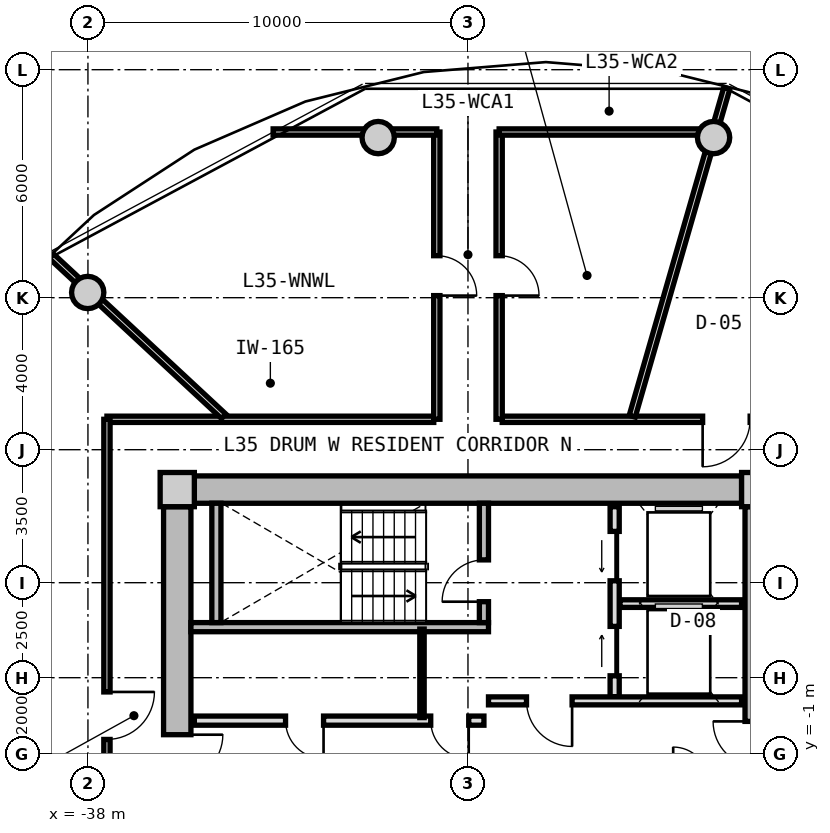
"""IFC4 building model, lengths in metres.
Left out: names, types, materials, properties, quantities, classifications, styles, units other than length and angle.
Written with IfcOpenShell. Run it as: python <this file> out.ifc"""

import sys

from ifc_helpers import new_model, si_unit, direction, frame, frame_2d, origin, origin_2d, place, context, subcontext, project, spatial, rectangle, circle, extrude, source, transform, mapped, element, fill, save


model = new_model("IFC4")
c1 = context("Model", 3, precision=1e-05, world=origin(), true_north=direction((0.0, 1.0)))
c2 = subcontext(c1, "Body", "Model", "MODEL_VIEW")
j1 = project(units=[si_unit("LENGTHUNIT", "METRE"), si_unit("PLANEANGLEUNIT", "RADIAN")], contexts=[c1])
p1 = place(None, origin())
s1 = spatial("IfcSite", under=j1, at=p1, CompositionType="ELEMENT")
p2 = place(p1, origin())
s2 = spatial("IfcBuilding", under=s1, at=p2, CompositionType="ELEMENT")
p3 = place(p2, frame((0.0, 0.0, 114.55)))
s3 = spatial("IfcBuildingStorey", under=s2, at=p3, CompositionType="ELEMENT", Elevation=114.55)
m1 = source(origin(), c2, "Body", "SweptSolid", [
    extrude(rectangle(XDim=0.9, YDim=0.9, at=origin_2d()), origin(), (0.0, 0.0, 1.0), 3.05),
])
for number, where, z_axis, x_axis in (
    (1, (-20.35, 5.95, 0.0), (0.0, 0.0, 1.0), (1.0, 0.0, 0.0)),
    (2, (-35.65, 5.95, 0.0), (0.0, 0.0, 1.0), (1.0, 0.0, 0.0)),
):
    element("IfcColumn", number, at=place(p3, frame(where, z_axis=z_axis, x_axis=x_axis)), inside=s3, PredefinedType="COLUMN", context=c2, shape_type="MappedRepresentation", body=[
        mapped(m1, transform((0.0, 0.0, 0.0), x_axis=(1.0, 0.0, 0.0), y_axis=(0.0, 1.0, 0.0), z_axis=(0.0, 0.0, 1.0), scale=1.0)),
    ])
m2 = source(origin(), c2, "Body", "SweptSolid", [
    extrude(rectangle(XDim=14.4, YDim=0.72, at=frame_2d((7.2, 0.0))), origin(), (0.0, 0.0, 1.0), 2.79),
])
p4 = place(p3, frame((-35.2, 5.95, 0.0), z_axis=(0.0, 0.0, 1.0), x_axis=(1.0, 0.0, 0.0)))
e3 = element("IfcWall", 3, at=p4, inside=s3, PredefinedType="SHEAR", context=c2, shape_type="MappedRepresentation", body=[
    mapped(m2, transform((0.0, 0.0, 0.0), x_axis=(1.0, 0.0, 0.0), y_axis=(0.0, 1.0, 0.0), z_axis=(0.0, 0.0, 1.0), scale=1.0)),
])
m3 = source(origin(), c2, "Body", "SweptSolid", [
    extrude(rectangle(XDim=11.0, YDim=0.72, at=frame_2d((5.5, 0.0))), origin(), (0.0, 0.0, 1.0), 2.79),
])
p5 = place(p3, frame((-35.65, -5.5, 0.0), z_axis=(0.0, 0.0, 1.0), x_axis=(0.0, 1.0, 0.0)))
e4 = element("IfcWall", 4, at=p5, inside=s3, PredefinedType="SHEAR", context=c2, shape_type="MappedRepresentation", body=[
    mapped(m3, transform((0.0, 0.0, 0.0), x_axis=(1.0, 0.0, 0.0), y_axis=(0.0, 1.0, 0.0), z_axis=(0.0, 0.0, 1.0), scale=1.0)),
])
p6 = place(p5, frame((3.8, 0.0, 0.0)))
e5 = element("IfcOpeningElement", 5, at=p6, cuts=e4, PredefinedType="OPENING", context=c2, shape_type="SweptSolid", body=[
    extrude(rectangle(XDim=1.2, YDim=2.15, at=frame_2d((0.6, 1.075))), frame((0.0, 0.37, 0.0), z_axis=(0.0, -1.0, 0.0), x_axis=(1.0, 0.0, 0.0)), (0.0, 0.0, 1.0), 0.74),
])
p7 = place(p3, frame((-20.35, 5.5, 0.0), z_axis=(0.0, 0.0, 1.0), x_axis=(0.0, -1.0, 0.0)))
e6 = element("IfcWall", 6, at=p7, inside=s3, PredefinedType="SHEAR", context=c2, shape_type="MappedRepresentation", body=[
    mapped(m3, transform((0.0, 0.0, 0.0), x_axis=(1.0, 0.0, 0.0), y_axis=(0.0, 1.0, 0.0), z_axis=(0.0, 0.0, 1.0), scale=1.0)),
])
p8 = place(p7, frame((5.65, 0.0, 0.0)))
e7 = element("IfcOpeningElement", 7, at=p8, cuts=e6, PredefinedType="OPENING", context=c2, shape_type="SweptSolid", body=[
    extrude(rectangle(XDim=1.2, YDim=2.15, at=frame_2d((0.6, 1.075))), frame((0.0, 0.37, 0.0), z_axis=(0.0, -1.0, 0.0), x_axis=(1.0, 0.0, 0.0)), (0.0, 0.0, 1.0), 0.74),
])
p9 = place(p7, frame((9.3, 0.0, 0.0)))
e8 = element("IfcOpeningElement", 8, at=p9, cuts=e6, PredefinedType="OPENING", context=c2, shape_type="SweptSolid", body=[
    extrude(rectangle(XDim=1.0, YDim=2.1, at=frame_2d((0.5, 1.05))), frame((0.0, 0.37, 0.0), z_axis=(0.0, -1.0, 0.0), x_axis=(1.0, 0.0, 0.0)), (0.0, 0.0, 1.0), 0.74),
])
m4 = source(origin(), c2, "Body", "SweptSolid", [
    extrude(circle(Radius=0.425, at=origin_2d()), origin(), (0.0, 0.0, 1.0), 3.05),
])
for number, where, z_axis, x_axis in (
    (9, (-21.537, 15.213, 0.0), (0.0, 0.0, 1.0), (1.0, 0.0, 0.0)),
    (10, (-30.363, 15.213, 0.0), (0.0, 0.0, 1.0), (1.0, 0.0, 0.0)),
    (11, (-38.006, 11.137, 0.0), (0.0, 0.0, 1.0), (1.0, 0.0, 0.0)),
):
    element("IfcColumn", number, at=place(p3, frame(where, z_axis=z_axis, x_axis=x_axis)), inside=s3, PredefinedType="COLUMN", context=c2, shape_type="MappedRepresentation", body=[
        mapped(m4, transform((0.0, 0.0, 0.0), x_axis=(1.0, 0.0, 0.0), y_axis=(0.0, 1.0, 0.0), z_axis=(0.0, 0.0, 1.0), scale=1.0)),
    ])
m5 = source(origin(), c2, "Body", "SweptSolid", [
    extrude(rectangle(XDim=7.83, YDim=0.24, at=frame_2d((3.915, 0.0))), origin(), (0.0, 0.0, 1.0), 2.79),
])
p10 = place(p3, frame((-35.29, 2.33, 0.0), z_axis=(0.0, 0.0, 1.0), x_axis=(1.0, 0.0, 0.0)))
e12 = element("IfcWall", 12, at=p10, inside=s3, PredefinedType="PARTITIONING", context=c2, shape_type="MappedRepresentation", body=[
    mapped(m5, transform((0.0, 0.0, 0.0), x_axis=(1.0, 0.0, 0.0), y_axis=(0.0, 1.0, 0.0), z_axis=(0.0, 0.0, 1.0), scale=1.0)),
])
m6 = source(origin(), c2, "Body", "SweptSolid", [
    extrude(rectangle(XDim=3.14, YDim=0.24, at=frame_2d((1.57, 0.0))), origin(), (0.0, 0.0, 1.0), 2.79),
])
p11 = place(p3, frame((-34.62, 2.45, 0.0), z_axis=(0.0, 0.0, 1.0), x_axis=(0.0, 1.0, 0.0)))
e13 = element("IfcWall", 13, at=p11, inside=s3, PredefinedType="PARTITIONING", context=c2, shape_type="MappedRepresentation", body=[
    mapped(m6, transform((0.0, 0.0, 0.0), x_axis=(1.0, 0.0, 0.0), y_axis=(0.0, 1.0, 0.0), z_axis=(0.0, 0.0, 1.0), scale=1.0)),
])
p12 = place(p3, frame((-27.58, 2.45, 0.0), z_axis=(0.0, 0.0, 1.0), x_axis=(0.0, 1.0, 0.0)))
e14 = element("IfcWall", 14, at=p12, inside=s3, PredefinedType="PARTITIONING", context=c2, shape_type="MappedRepresentation", body=[
    mapped(m6, transform((0.0, 0.0, 0.0), x_axis=(1.0, 0.0, 0.0), y_axis=(0.0, 1.0, 0.0), z_axis=(0.0, 0.0, 1.0), scale=1.0)),
])
p13 = place(p12, frame((0.55, 0.0, 0.0)))
e15 = element("IfcOpeningElement", 15, at=p13, cuts=e14, PredefinedType="OPENING", context=c2, shape_type="SweptSolid", body=[
    extrude(rectangle(XDim=1.1, YDim=2.15, at=frame_2d((0.55, 1.075))), frame((0.0, 0.13, 0.0), z_axis=(0.0, -1.0, 0.0), x_axis=(1.0, 0.0, 0.0)), (0.0, 0.0, 1.0), 0.26),
])
m7 = source(origin(), c2, "Body", "SweptSolid", [
    extrude(rectangle(XDim=5.0, YDim=0.24, at=frame_2d((2.5, 0.0))), origin(), (0.0, 0.0, 1.0), 2.775),
])
p14 = place(p3, frame((-24.14, 0.5, 0.0), z_axis=(0.0, 0.0, 1.0), x_axis=(0.0, 1.0, 0.0)))
e16 = element("IfcWall", 16, at=p14, inside=s3, PredefinedType="PARTITIONING", context=c2, shape_type="MappedRepresentation", body=[
    mapped(m7, transform((0.0, 0.0, 0.0), x_axis=(1.0, 0.0, 0.0), y_axis=(0.0, 1.0, 0.0), z_axis=(0.0, 0.0, 1.0), scale=1.0)),
])
p15 = place(p14, frame((3.05, 0.0, 0.0)))
e17 = element("IfcOpeningElement", 17, at=p15, cuts=e16, PredefinedType="OPENING", context=c2, shape_type="SweptSolid", body=[
    extrude(rectangle(XDim=1.3, YDim=2.2, at=frame_2d((0.65, 1.1))), frame((0.0, 0.13, 0.0), z_axis=(0.0, -1.0, 0.0), x_axis=(1.0, 0.0, 0.0)), (0.0, 0.0, 1.0), 0.26),
])
p16 = place(p14, frame((0.55, 0.0, 0.0)))
e18 = element("IfcOpeningElement", 18, at=p16, cuts=e16, PredefinedType="OPENING", context=c2, shape_type="SweptSolid", body=[
    extrude(rectangle(XDim=1.3, YDim=2.2, at=frame_2d((0.65, 1.1))), frame((0.0, 0.13, 0.0), z_axis=(0.0, -1.0, 0.0), x_axis=(1.0, 0.0, 0.0)), (0.0, 0.0, 1.0), 0.26),
])
m8 = source(origin(), c2, "Body", "SweptSolid", [
    extrude(rectangle(XDim=3.2, YDim=0.2, at=frame_2d((1.6, 0.0))), origin(), (0.0, 0.0, 1.0), 2.775),
])
p17 = place(p3, frame((-24.0, 2.95, 0.0), z_axis=(0.0, 0.0, 1.0), x_axis=(1.0, 0.0, 0.0)))
e19 = element("IfcWall", 19, at=p17, inside=s3, PredefinedType="PARTITIONING", context=c2, shape_type="MappedRepresentation", body=[
    mapped(m8, transform((0.0, 0.0, 0.0), x_axis=(1.0, 0.0, 0.0), y_axis=(0.0, 1.0, 0.0), z_axis=(0.0, 0.0, 1.0), scale=1.0)),
])
m9 = source(origin(), c2, "Body", "SweptSolid", [
    extrude(rectangle(XDim=6.66, YDim=0.21, at=frame_2d((3.33, 0.0))), origin(), (0.0, 0.0, 1.0), 2.775),
])
p18 = place(p3, frame((-27.46, 0.39, 0.0), z_axis=(0.0, 0.0, 1.0), x_axis=(1.0, 0.0, 0.0)))
e20 = element("IfcWall", 20, at=p18, inside=s3, PredefinedType="PARTITIONING", context=c2, shape_type="MappedRepresentation", body=[
    mapped(m9, transform((0.0, 0.0, 0.0), x_axis=(1.0, 0.0, 0.0), y_axis=(0.0, 1.0, 0.0), z_axis=(0.0, 0.0, 1.0), scale=1.0)),
])
p19 = place(p18, frame((1.0, 0.0, 0.0)))
e21 = element("IfcOpeningElement", 21, at=p19, cuts=e20, PredefinedType="OPENING", context=c2, shape_type="SweptSolid", body=[
    extrude(rectangle(XDim=1.2, YDim=2.15, at=frame_2d((0.6, 1.075))), frame((0.0, 0.115, 0.0), z_axis=(0.0, -1.0, 0.0), x_axis=(1.0, 0.0, 0.0)), (0.0, 0.0, 1.0), 0.23),
])
m10 = source(origin(), c2, "Body", "SweptSolid", [
    extrude(rectangle(XDim=7.62, YDim=0.24, at=frame_2d((3.81, 0.0))), origin(), (0.0, 0.0, 1.0), 2.775),
])
p20 = place(p3, frame((-35.2, -0.13, 0.0), z_axis=(0.0, 0.0, 1.0), x_axis=(1.0, 0.0, 0.0)))
e22 = element("IfcWall", 22, at=p20, inside=s3, PredefinedType="PARTITIONING", context=c2, shape_type="MappedRepresentation", body=[
    mapped(m10, transform((0.0, 0.0, 0.0), x_axis=(1.0, 0.0, 0.0), y_axis=(0.0, 1.0, 0.0), z_axis=(0.0, 0.0, 1.0), scale=1.0)),
])
p21 = place(p20, frame((6.22, 0.0, 0.0)))
e23 = element("IfcOpeningElement", 23, at=p21, cuts=e22, PredefinedType="OPENING", context=c2, shape_type="SweptSolid", body=[
    extrude(rectangle(XDim=1.0, YDim=2.1, at=frame_2d((0.5, 1.05))), frame((0.0, 0.13, 0.0), z_axis=(0.0, -1.0, 0.0), x_axis=(1.0, 0.0, 0.0)), (0.0, 0.0, 1.0), 0.26),
])
p22 = place(p20, frame((2.4, 0.0, 0.0)))
e24 = element("IfcOpeningElement", 24, at=p22, cuts=e22, PredefinedType="OPENING", context=c2, shape_type="SweptSolid", body=[
    extrude(rectangle(XDim=1.0, YDim=2.1, at=frame_2d((0.5, 1.05))), frame((0.0, 0.13, 0.0), z_axis=(0.0, -1.0, 0.0), x_axis=(1.0, 0.0, 0.0)), (0.0, 0.0, 1.0), 0.26),
])
m11 = source(origin(), c2, "Body", "SweptSolid", [
    extrude(rectangle(XDim=2.33, YDim=0.115, at=frame_2d((1.165, 0.0))), origin(), (0.0, 0.0, 1.0), 2.775),
])
p23 = place(p3, frame((-29.21, -0.05, 0.0), z_axis=(0.0, 0.0, 1.0), x_axis=(0.0, 1.0, 0.0)))
e25 = element("IfcWall", 25, at=p23, inside=s3, PredefinedType="PARTITIONING", context=c2, shape_type="MappedRepresentation", body=[
    mapped(m11, transform((0.0, 0.0, 0.0), x_axis=(1.0, 0.0, 0.0), y_axis=(0.0, 1.0, 0.0), z_axis=(0.0, 0.0, 1.0), scale=1.0)),
])
m12 = source(origin(), c2, "Body", "SweptSolid", [
    extrude(rectangle(XDim=8.6, YDim=0.165, at=frame_2d((4.3, 0.0))), origin(), (0.0, 0.0, 1.0), 2.775),
])
p24 = place(p3, frame((-37.5, 7.8, 0.0), z_axis=(0.0, 0.0, 1.0), x_axis=(1.0, 0.0, 0.0)))
e26 = element("IfcWall", 26, at=p24, inside=s3, PredefinedType="PARTITIONING", context=c2, shape_type="MappedRepresentation", body=[
    mapped(m12, transform((0.0, 0.0, 0.0), x_axis=(1.0, 0.0, 0.0), y_axis=(0.0, 1.0, 0.0), z_axis=(0.0, 0.0, 1.0), scale=1.0)),
])
p25 = place(p3, frame((-27.1, 7.8, 0.0), z_axis=(0.0, 0.0, 1.0), x_axis=(1.0, 0.0, 0.0)))
e27 = element("IfcWall", 27, at=p25, inside=s3, PredefinedType="PARTITIONING", context=c2, shape_type="MappedRepresentation", body=[
    mapped(m12, transform((0.0, 0.0, 0.0), x_axis=(1.0, 0.0, 0.0), y_axis=(0.0, 1.0, 0.0), z_axis=(0.0, 0.0, 1.0), scale=1.0)),
])
p26 = place(p25, frame((5.275, 0.0, 0.0)))
e28 = element("IfcOpeningElement", 28, at=p26, cuts=e27, PredefinedType="OPENING", context=c2, shape_type="SweptSolid", body=[
    extrude(rectangle(XDim=1.25, YDim=2.2, at=frame_2d((0.625, 1.1))), frame((0.0, 0.093, 0.0), z_axis=(0.0, -1.0, 0.0), x_axis=(1.0, 0.0, 0.0)), (0.0, 0.0, 1.0), 0.185),
])
m13 = source(origin(), c2, "Body", "SweptSolid", [
    extrude(rectangle(XDim=15.6, YDim=0.165, at=frame_2d((7.8, 0.0))), origin(), (0.0, 0.0, 1.0), 2.775),
])
p27 = place(p3, frame((-37.5, -7.8, 0.0), z_axis=(0.0, 0.0, 1.0), x_axis=(0.0, 1.0, 0.0)))
e29 = element("IfcWall", 29, at=p27, inside=s3, PredefinedType="PARTITIONING", context=c2, shape_type="MappedRepresentation", body=[
    mapped(m13, transform((0.0, 0.0, 0.0), x_axis=(1.0, 0.0, 0.0), y_axis=(0.0, 1.0, 0.0), z_axis=(0.0, 0.0, 1.0), scale=1.0)),
])
p28 = place(p27, frame((7.175, 0.0, 0.0)))
e30 = element("IfcOpeningElement", 30, at=p28, cuts=e29, PredefinedType="OPENING", context=c2, shape_type="SweptSolid", body=[
    extrude(rectangle(XDim=1.25, YDim=2.2, at=frame_2d((0.625, 1.1))), frame((0.0, 0.093, 0.0), z_axis=(0.0, -1.0, 0.0), x_axis=(1.0, 0.0, 0.0)), (0.0, 0.0, 1.0), 0.185),
])
m14 = source(origin(), c2, "Body", "SweptSolid", [
    extrude(rectangle(XDim=8.989, YDim=0.165, at=frame_2d((4.495, 0.0))), origin(), (0.0, 0.0, 1.0), 2.275),
])
p29 = place(p3, frame((-23.678, 7.88, 0.0), z_axis=(0.0, 0.0, 1.0), x_axis=(0.27702323008, 0.960863221274, 0.0)))
e31 = element("IfcWall", 31, at=p29, inside=s3, PredefinedType="PARTITIONING", context=c2, shape_type="MappedRepresentation", body=[
    mapped(m14, transform((0.0, 0.0, 0.0), x_axis=(1.0, 0.0, 0.0), y_axis=(0.0, 1.0, 0.0), z_axis=(0.0, 0.0, 1.0), scale=1.0)),
])
m15 = source(origin(), c2, "Body", "SweptSolid", [
    extrude(rectangle(XDim=6.187, YDim=0.165, at=frame_2d((3.093, 0.0))), origin(), (0.0, 0.0, 1.0), 2.275),
])
p30 = place(p3, frame((-34.429, 7.88, 0.0), z_axis=(0.0, 0.0, 1.0), x_axis=(-0.732501077882, 0.680765870841, 0.0)))
e32 = element("IfcWall", 32, at=p30, inside=s3, PredefinedType="PARTITIONING", context=c2, shape_type="MappedRepresentation", body=[
    mapped(m15, transform((0.0, 0.0, 0.0), x_axis=(1.0, 0.0, 0.0), y_axis=(0.0, 1.0, 0.0), z_axis=(0.0, 0.0, 1.0), scale=1.0)),
])
m16 = source(origin(), c2, "Body", "SweptSolid", [
    extrude(rectangle(XDim=7.56, YDim=0.165, at=frame_2d((3.78, 0.0))), origin(), (0.0, 0.0, 1.0), 2.775),
])
p31 = place(p3, frame((-28.82, 7.8, 0.0), z_axis=(0.0, 0.0, 1.0), x_axis=(0.0, 1.0, 0.0)))
e33 = element("IfcWall", 33, at=p31, inside=s3, PredefinedType="PARTITIONING", context=c2, shape_type="MappedRepresentation", body=[
    mapped(m16, transform((0.0, 0.0, 0.0), x_axis=(1.0, 0.0, 0.0), y_axis=(0.0, 1.0, 0.0), z_axis=(0.0, 0.0, 1.0), scale=1.0)),
])
p32 = place(p31, frame((3.255, 0.0, 0.0)))
e34 = element("IfcOpeningElement", 34, at=p32, cuts=e33, PredefinedType="OPENING", context=c2, shape_type="SweptSolid", body=[
    extrude(rectangle(XDim=1.05, YDim=2.15, at=frame_2d((0.525, 1.075))), frame((0.0, 0.093, 0.0), z_axis=(0.0, -1.0, 0.0), x_axis=(1.0, 0.0, 0.0)), (0.0, 0.0, 1.0), 0.185),
])
m17 = source(origin(), c2, "Body", "SweptSolid", [
    extrude(rectangle(XDim=4.307, YDim=0.165, at=frame_2d((2.153, 0.0))), origin(), (0.0, 0.0, 1.0), 2.275),
])
p33 = place(p3, frame((-33.127, 15.36, 0.0), z_axis=(0.0, 0.0, 1.0), x_axis=(1.0, 0.0, 0.0)))
e35 = element("IfcWall", 35, at=p33, inside=s3, PredefinedType="PARTITIONING", context=c2, shape_type="MappedRepresentation", body=[
    mapped(m17, transform((0.0, 0.0, 0.0), x_axis=(1.0, 0.0, 0.0), y_axis=(0.0, 1.0, 0.0), z_axis=(0.0, 0.0, 1.0), scale=1.0)),
])
p34 = place(p3, frame((-27.18, 7.8, 0.0), z_axis=(0.0, 0.0, 1.0), x_axis=(0.0, 1.0, 0.0)))
e36 = element("IfcWall", 36, at=p34, inside=s3, PredefinedType="PARTITIONING", context=c2, shape_type="MappedRepresentation", body=[
    mapped(m16, transform((0.0, 0.0, 0.0), x_axis=(1.0, 0.0, 0.0), y_axis=(0.0, 1.0, 0.0), z_axis=(0.0, 0.0, 1.0), scale=1.0)),
])
p35 = place(p34, frame((3.255, 0.0, 0.0)))
e37 = element("IfcOpeningElement", 37, at=p35, cuts=e36, PredefinedType="OPENING", context=c2, shape_type="SweptSolid", body=[
    extrude(rectangle(XDim=1.05, YDim=2.15, at=frame_2d((0.525, 1.075))), frame((0.0, 0.093, 0.0), z_axis=(0.0, -1.0, 0.0), x_axis=(1.0, 0.0, 0.0)), (0.0, 0.0, 1.0), 0.185),
])
m18 = source(origin(), c2, "Body", "SweptSolid", [
    extrude(rectangle(XDim=5.814, YDim=0.165, at=frame_2d((2.907, 0.0))), origin(), (0.0, 0.0, 1.0), 2.275),
])
p36 = place(p3, frame((-27.18, 15.36, 0.0), z_axis=(0.0, 0.0, 1.0), x_axis=(1.0, 0.0, 0.0)))
e38 = element("IfcWall", 38, at=p36, inside=s3, PredefinedType="PARTITIONING", context=c2, shape_type="MappedRepresentation", body=[
    mapped(m18, transform((0.0, 0.0, 0.0), x_axis=(1.0, 0.0, 0.0), y_axis=(0.0, 1.0, 0.0), z_axis=(0.0, 0.0, 1.0), scale=1.0)),
])
m19 = source(origin(), c2, "Body", "SweptSolid", [
    extrude(rectangle(XDim=1.1, YDim=2.15, at=frame_2d((0.55, 1.075))), frame((0.0, 0.025, 0.0), z_axis=(0.0, -1.0, 0.0), x_axis=(1.0, 0.0, 0.0)), (0.0, 0.0, 1.0), 0.05),
])
p37 = place(p13, origin())
e39 = element("IfcDoor", 39, at=p37, inside=s3, OperationType="SINGLE_SWING_LEFT", PredefinedType="DOOR", context=c2, shape_type="MappedRepresentation", body=[
    mapped(m19, transform((0.0, 0.0, 0.0), x_axis=(1.0, 0.0, 0.0), y_axis=(0.0, 1.0, 0.0), z_axis=(0.0, 0.0, 1.0), scale=1.0)),
])
fill(e15, e39)
m20 = source(origin(), c2, "Body", "SweptSolid", [
    extrude(rectangle(XDim=1.3, YDim=2.2, at=frame_2d((0.65, 1.1))), frame((0.0, 0.025, 0.0), z_axis=(0.0, -1.0, 0.0), x_axis=(1.0, 0.0, 0.0)), (0.0, 0.0, 1.0), 0.05),
])
p38 = place(p15, origin())
e40 = element("IfcDoor", 40, at=p38, inside=s3, OperationType="SLIDING_TO_LEFT", PredefinedType="DOOR", context=c2, shape_type="MappedRepresentation", body=[
    mapped(m20, transform((0.0, 0.0, 0.0), x_axis=(1.0, 0.0, 0.0), y_axis=(0.0, 1.0, 0.0), z_axis=(0.0, 0.0, 1.0), scale=1.0)),
])
fill(e17, e40)
p39 = place(p16, origin())
e41 = element("IfcDoor", 41, at=p39, inside=s3, OperationType="SLIDING_TO_RIGHT", PredefinedType="DOOR", context=c2, shape_type="MappedRepresentation", body=[
    mapped(m20, transform((0.0, 0.0, 0.0), x_axis=(1.0, 0.0, 0.0), y_axis=(0.0, 1.0, 0.0), z_axis=(0.0, 0.0, 1.0), scale=1.0)),
])
fill(e18, e41)
m21 = source(origin(), c2, "Body", "SweptSolid", [
    extrude(rectangle(XDim=1.2, YDim=2.15, at=frame_2d((0.6, 1.075))), frame((0.0, 0.025, 0.0), z_axis=(0.0, -1.0, 0.0), x_axis=(1.0, 0.0, 0.0)), (0.0, 0.0, 1.0), 0.05),
])
p40 = place(p19, frame((1.2, 0.0, 0.0), z_axis=(0.0, 0.0, 1.0), x_axis=(-1.0, 0.0, 0.0)))
e42 = element("IfcDoor", 42, at=p40, inside=s3, OperationType="SINGLE_SWING_LEFT", PredefinedType="DOOR", context=c2, shape_type="MappedRepresentation", body=[
    mapped(m21, transform((0.0, 0.0, 0.0), x_axis=(1.0, 0.0, 0.0), y_axis=(0.0, 1.0, 0.0), z_axis=(0.0, 0.0, 1.0), scale=1.0)),
])
fill(e21, e42)
p41 = place(p6, frame((1.2, 0.0, 0.0), z_axis=(0.0, 0.0, 1.0), x_axis=(-1.0, 0.0, 0.0)))
e43 = element("IfcDoor", 43, at=p41, inside=s3, OperationType="SINGLE_SWING_LEFT", PredefinedType="DOOR", context=c2, shape_type="MappedRepresentation", body=[
    mapped(m21, transform((0.0, 0.0, 0.0), x_axis=(1.0, 0.0, 0.0), y_axis=(0.0, 1.0, 0.0), z_axis=(0.0, 0.0, 1.0), scale=1.0)),
])
fill(e5, e43)
m22 = source(origin(), c2, "Body", "SweptSolid", [
    extrude(rectangle(XDim=1.0, YDim=2.1, at=frame_2d((0.5, 1.05))), frame((0.0, 0.025, 0.0), z_axis=(0.0, -1.0, 0.0), x_axis=(1.0, 0.0, 0.0)), (0.0, 0.0, 1.0), 0.05),
])
p42 = place(p21, frame((1.0, 0.0, 0.0), z_axis=(0.0, 0.0, 1.0), x_axis=(-1.0, 0.0, 0.0)))
e44 = element("IfcDoor", 44, at=p42, inside=s3, OperationType="SINGLE_SWING_LEFT", PredefinedType="DOOR", context=c2, shape_type="MappedRepresentation", body=[
    mapped(m22, transform((0.0, 0.0, 0.0), x_axis=(1.0, 0.0, 0.0), y_axis=(0.0, 1.0, 0.0), z_axis=(0.0, 0.0, 1.0), scale=1.0)),
])
fill(e23, e44)
p43 = place(p22, frame((1.0, 0.0, 0.0), z_axis=(0.0, 0.0, 1.0), x_axis=(-1.0, 0.0, 0.0)))
e45 = element("IfcDoor", 45, at=p43, inside=s3, OperationType="SINGLE_SWING_LEFT", PredefinedType="DOOR", context=c2, shape_type="MappedRepresentation", body=[
    mapped(m22, transform((0.0, 0.0, 0.0), x_axis=(1.0, 0.0, 0.0), y_axis=(0.0, 1.0, 0.0), z_axis=(0.0, 0.0, 1.0), scale=1.0)),
])
fill(e24, e45)
m23 = source(origin(), c2, "Body", "SweptSolid", [
    extrude(rectangle(XDim=1.05, YDim=2.15, at=frame_2d((0.525, 1.075))), frame((0.0, 0.025, 0.0), z_axis=(0.0, -1.0, 0.0), x_axis=(1.0, 0.0, 0.0)), (0.0, 0.0, 1.0), 0.05),
])
p44 = place(p32, frame((1.05, 0.0, 0.0), z_axis=(0.0, 0.0, 1.0), x_axis=(-1.0, 0.0, 0.0)))
e46 = element("IfcDoor", 46, at=p44, inside=s3, OperationType="SINGLE_SWING_RIGHT", PredefinedType="DOOR", context=c2, shape_type="MappedRepresentation", body=[
    mapped(m23, transform((0.0, 0.0, 0.0), x_axis=(1.0, 0.0, 0.0), y_axis=(0.0, 1.0, 0.0), z_axis=(0.0, 0.0, 1.0), scale=1.0)),
])
fill(e34, e46)
p45 = place(p35, frame((1.05, 0.0, 0.0), z_axis=(0.0, 0.0, 1.0), x_axis=(-1.0, 0.0, 0.0)))
e47 = element("IfcDoor", 47, at=p45, inside=s3, OperationType="SINGLE_SWING_RIGHT", PredefinedType="DOOR", context=c2, shape_type="MappedRepresentation", body=[
    mapped(m23, transform((0.0, 0.0, 0.0), x_axis=(1.0, 0.0, 0.0), y_axis=(0.0, 1.0, 0.0), z_axis=(0.0, 0.0, 1.0), scale=1.0)),
])
fill(e37, e47)
m24 = source(origin(), c2, "Body", "SweptSolid", [
    extrude(rectangle(XDim=1.25, YDim=2.2, at=frame_2d((0.625, 1.1))), frame((0.0, 0.025, 0.0), z_axis=(0.0, -1.0, 0.0), x_axis=(1.0, 0.0, 0.0)), (0.0, 0.0, 1.0), 0.05),
])
p46 = place(p28, frame((1.25, 0.0, 0.0), z_axis=(0.0, 0.0, 1.0), x_axis=(-1.0, 0.0, 0.0)))
e48 = element("IfcDoor", 48, at=p46, inside=s3, OperationType="SINGLE_SWING_LEFT", PredefinedType="DOOR", context=c2, shape_type="MappedRepresentation", body=[
    mapped(m24, transform((0.0, 0.0, 0.0), x_axis=(1.0, 0.0, 0.0), y_axis=(0.0, 1.0, 0.0), z_axis=(0.0, 0.0, 1.0), scale=1.0)),
])
fill(e30, e48)
p47 = place(p26, frame((1.25, 0.0, 0.0), z_axis=(0.0, 0.0, 1.0), x_axis=(-1.0, 0.0, 0.0)))
e49 = element("IfcDoor", 49, at=p47, inside=s3, OperationType="SINGLE_SWING_RIGHT", PredefinedType="DOOR", context=c2, shape_type="MappedRepresentation", body=[
    mapped(m24, transform((0.0, 0.0, 0.0), x_axis=(1.0, 0.0, 0.0), y_axis=(0.0, 1.0, 0.0), z_axis=(0.0, 0.0, 1.0), scale=1.0)),
])
fill(e28, e49)
save(model, sys.argv[1])
